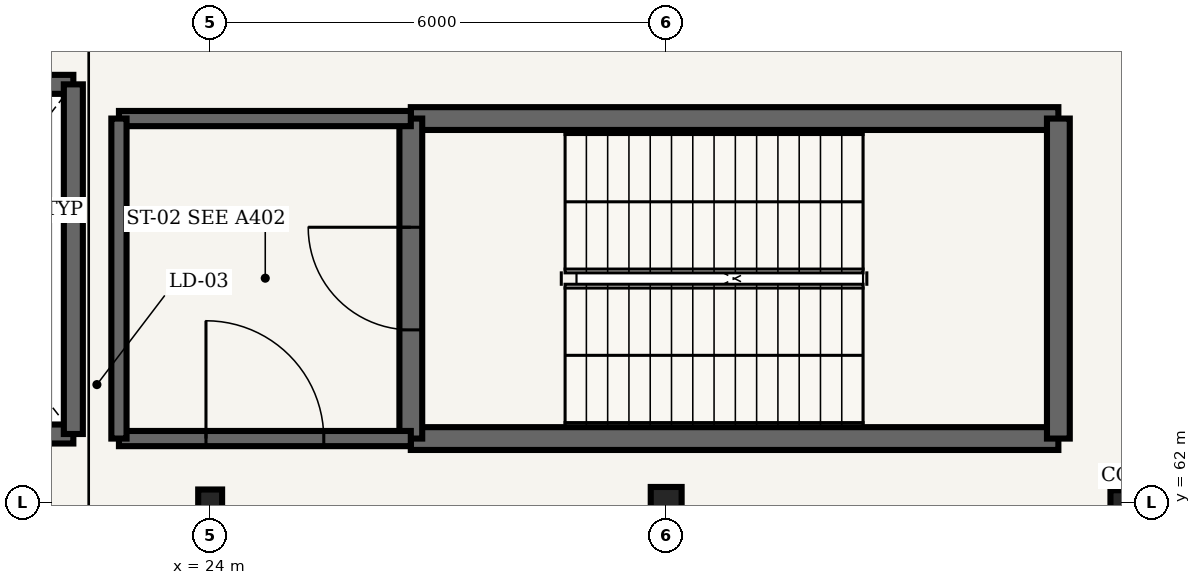
"""IFC4 building model, lengths in metres.
Left out: names, types, materials, properties, quantities, classifications, styles, units other than length and angle.
Written with IfcOpenShell. Run it as: python <this file> out.ifc"""

import sys

from ifc_helpers import new_model, si_unit, direction, frame, frame_2d, origin, origin_2d, place, context, subcontext, project, spatial, rectangle, hollow_circle, i_section, extrude, element, fill, save


model = new_model("IFC4")
c1 = context("Model", 3, precision=1e-05, world=origin(), true_north=direction((0.0, 1.0)))
c2 = subcontext(c1, "Body", "Model", "MODEL_VIEW")
j1 = project(units=[si_unit("LENGTHUNIT", "METRE"), si_unit("PLANEANGLEUNIT", "RADIAN")], contexts=[c1])
p1 = place(None, origin())
s1 = spatial("IfcSite", under=j1, at=p1, CompositionType="ELEMENT")
p2 = place(p1, origin())
s2 = spatial("IfcBuilding", under=s1, at=p2, CompositionType="ELEMENT")
p3 = place(p2, frame((0.0, 0.0, 5.4)))
s3 = spatial("IfcBuildingStorey", under=s2, at=p3, CompositionType="ELEMENT", Elevation=5.4)
p4 = place(p3, frame((24.0, 62.0, 0.0), z_axis=(0.0, 0.0, 1.0), x_axis=(1.0, 0.0, 0.0)))
e1 = element("IfcColumn", 1, at=p4, inside=s3, PredefinedType="COLUMN", context=c2, shape_type="SweptSolid", body=[
    extrude(i_section(OverallWidth=0.314, OverallDepth=0.34, WebThickness=0.019, FlangeThickness=0.031, FilletRadius=0.015, at=origin_2d()), origin(), (0.0, 0.0, 1.0), 5.4),
])
p5 = place(p3, frame((30.0, 62.0, 0.0), z_axis=(0.0, 0.0, 1.0), x_axis=(1.0, 0.0, 0.0)))
e2 = element("IfcColumn", 2, at=p5, inside=s3, PredefinedType="COLUMN", context=c2, shape_type="SweptSolid", body=[
    extrude(hollow_circle(Radius=0.203, WallThickness=0.016, at=origin_2d()), origin(), (0.0, 0.0, 1.0), 5.4),
])
p6 = place(p3, frame((36.0, 62.0, 0.0), z_axis=(0.0, 0.0, 1.0), x_axis=(1.0, 0.0, 0.0)))
e3 = element("IfcColumn", 3, at=p6, inside=s3, PredefinedType="COLUMN", context=c2, shape_type="SweptSolid", body=[
    extrude(i_section(OverallWidth=0.309, OverallDepth=0.321, WebThickness=0.014, FlangeThickness=0.022, FilletRadius=0.015, at=origin_2d()), origin(), (0.0, 0.0, 1.0), 5.4),
])
for number, where, z_axis, x_axis in (
    (4, (26.64, 62.84, 0.0), (0.0, 0.0, 1.0), (1.0, 0.0, 0.0)),
    (5, (35.16, 67.05, 0.0), (0.0, 0.0, 1.0), (-1.0, 0.0, 0.0)),
):
    element("IfcWall", number, at=place(p3, frame(where, z_axis=z_axis, x_axis=x_axis)), inside=s3, PredefinedType="SHEAR", context=c2, shape_type="SweptSolid", body=[
        extrude(rectangle(XDim=8.52, YDim=0.3, at=frame_2d((4.26, 0.0))), origin(), (0.0, 0.0, 1.0), 5.15),
    ])
p7 = place(p3, frame((26.64, 67.05, 0.0), z_axis=(0.0, 0.0, 1.0), x_axis=(0.0, -1.0, 0.0)))
e6 = element("IfcWall", 6, at=p7, inside=s3, PredefinedType="SHEAR", context=c2, shape_type="SweptSolid", body=[
    extrude(rectangle(XDim=4.21, YDim=0.3, at=frame_2d((2.105, 0.0))), origin(), (0.0, 0.0, 1.0), 5.15),
])
p8 = place(p7, frame((1.43, 0.0, 0.0)))
e7 = element("IfcOpeningElement", 7, at=p8, cuts=e6, PredefinedType="OPENING", context=c2, shape_type="SweptSolid", body=[
    extrude(rectangle(XDim=1.35, YDim=2.2, at=frame_2d((0.675, 1.1))), frame((0.0, 0.16, 0.0), z_axis=(0.0, -1.0, 0.0), x_axis=(1.0, 0.0, 0.0)), (0.0, 0.0, 1.0), 0.32),
])
p9 = place(p3, frame((35.16, 62.84, 0.0), z_axis=(0.0, 0.0, 1.0), x_axis=(0.0, 1.0, 0.0)))
e8 = element("IfcWall", 8, at=p9, inside=s3, PredefinedType="SHEAR", context=c2, shape_type="SweptSolid", body=[
    extrude(rectangle(XDim=4.21, YDim=0.3, at=frame_2d((2.105, 0.0))), origin(), (0.0, 0.0, 1.0), 5.15),
])
p10 = place(p3, frame((22.8, 62.84, 0.0), z_axis=(0.0, 0.0, 1.0), x_axis=(1.0, 0.0, 0.0)))
e9 = element("IfcWall", 9, at=p10, inside=s3, PredefinedType="SHEAR", context=c2, shape_type="SweptSolid", body=[
    extrude(rectangle(XDim=3.84, YDim=0.2, at=frame_2d((1.92, 0.0))), origin(), (0.0, 0.0, 1.0), 5.15),
])
p11 = place(p10, frame((1.145, 0.0, 0.0)))
e10 = element("IfcOpeningElement", 10, at=p11, cuts=e9, PredefinedType="OPENING", context=c2, shape_type="SweptSolid", body=[
    extrude(rectangle(XDim=1.55, YDim=2.2, at=frame_2d((0.775, 1.1))), frame((0.0, 0.11, 0.0), z_axis=(0.0, -1.0, 0.0), x_axis=(1.0, 0.0, 0.0)), (0.0, 0.0, 1.0), 0.22),
])
p12 = place(p3, frame((26.64, 67.05, 0.0), z_axis=(0.0, 0.0, 1.0), x_axis=(-1.0, 0.0, 0.0)))
e11 = element("IfcWall", 11, at=p12, inside=s3, PredefinedType="SHEAR", context=c2, shape_type="SweptSolid", body=[
    extrude(rectangle(XDim=3.84, YDim=0.2, at=frame_2d((1.92, 0.0))), origin(), (0.0, 0.0, 1.0), 5.15),
])
p13 = place(p3, frame((22.8, 67.05, 0.0), z_axis=(0.0, 0.0, 1.0), x_axis=(0.0, -1.0, 0.0)))
e12 = element("IfcWall", 12, at=p13, inside=s3, PredefinedType="SHEAR", context=c2, shape_type="SweptSolid", body=[
    extrude(rectangle(XDim=4.21, YDim=0.2, at=frame_2d((2.105, 0.0))), origin(), (0.0, 0.0, 1.0), 5.15),
])
p14 = place(p3, frame((18.6, 62.9, 0.0), z_axis=(0.0, 0.0, 1.0), x_axis=(1.0, 0.0, 0.0)))
e13 = element("IfcWall", 13, at=p14, inside=s3, PredefinedType="SHEAR", context=c2, shape_type="SweptSolid", body=[
    extrude(rectangle(XDim=3.6, YDim=0.25, at=frame_2d((1.8, 0.0))), origin(), (0.0, 0.0, 1.0), 5.15),
])
p15 = place(p14, frame((0.6, 0.0, 0.0)))
e14 = element("IfcOpeningElement", 14, at=p15, cuts=e13, PredefinedType="OPENING", context=c2, shape_type="SweptSolid", body=[
    extrude(rectangle(XDim=2.4, YDim=2.6, at=frame_2d((1.2, 1.3))), frame((0.0, 0.135, 0.0), z_axis=(0.0, -1.0, 0.0), x_axis=(1.0, 0.0, 0.0)), (0.0, 0.0, 1.0), 0.27),
])
p16 = place(p3, frame((22.2, 67.5, 0.0), z_axis=(0.0, 0.0, 1.0), x_axis=(-1.0, 0.0, 0.0)))
e15 = element("IfcWall", 15, at=p16, inside=s3, PredefinedType="SHEAR", context=c2, shape_type="SweptSolid", body=[
    extrude(rectangle(XDim=3.6, YDim=0.25, at=frame_2d((1.8, 0.0))), origin(), (0.0, 0.0, 1.0), 5.15),
])
p17 = place(p3, frame((22.2, 62.9, 0.0), z_axis=(0.0, 0.0, 1.0), x_axis=(0.0, 1.0, 0.0)))
e16 = element("IfcWall", 16, at=p17, inside=s3, PredefinedType="SHEAR", context=c2, shape_type="SweptSolid", body=[
    extrude(rectangle(XDim=4.6, YDim=0.25, at=frame_2d((2.3, 0.0))), origin(), (0.0, 0.0, 1.0), 5.15),
])
p18 = place(p8, origin())
e17 = element("IfcDoor", 17, at=p18, inside=s3, OperationType="SINGLE_SWING_RIGHT", PredefinedType="DOOR", context=c2, shape_type="SweptSolid", body=[
    extrude(rectangle(XDim=1.35, YDim=2.2, at=frame_2d((0.675, 1.1))), frame((0.0, 0.025, 0.0), z_axis=(0.0, -1.0, 0.0), x_axis=(1.0, 0.0, 0.0)), (0.0, 0.0, 1.0), 0.05),
])
fill(e7, e17)
p19 = place(p11, origin())
e18 = element("IfcDoor", 18, at=p19, inside=s3, OperationType="SINGLE_SWING_LEFT", PredefinedType="DOOR", context=c2, shape_type="SweptSolid", body=[
    extrude(rectangle(XDim=1.55, YDim=2.2, at=frame_2d((0.775, 1.1))), frame((0.0, 0.025, 0.0), z_axis=(0.0, -1.0, 0.0), x_axis=(1.0, 0.0, 0.0)), (0.0, 0.0, 1.0), 0.05),
])
fill(e10, e18)
save(model, sys.argv[1])
